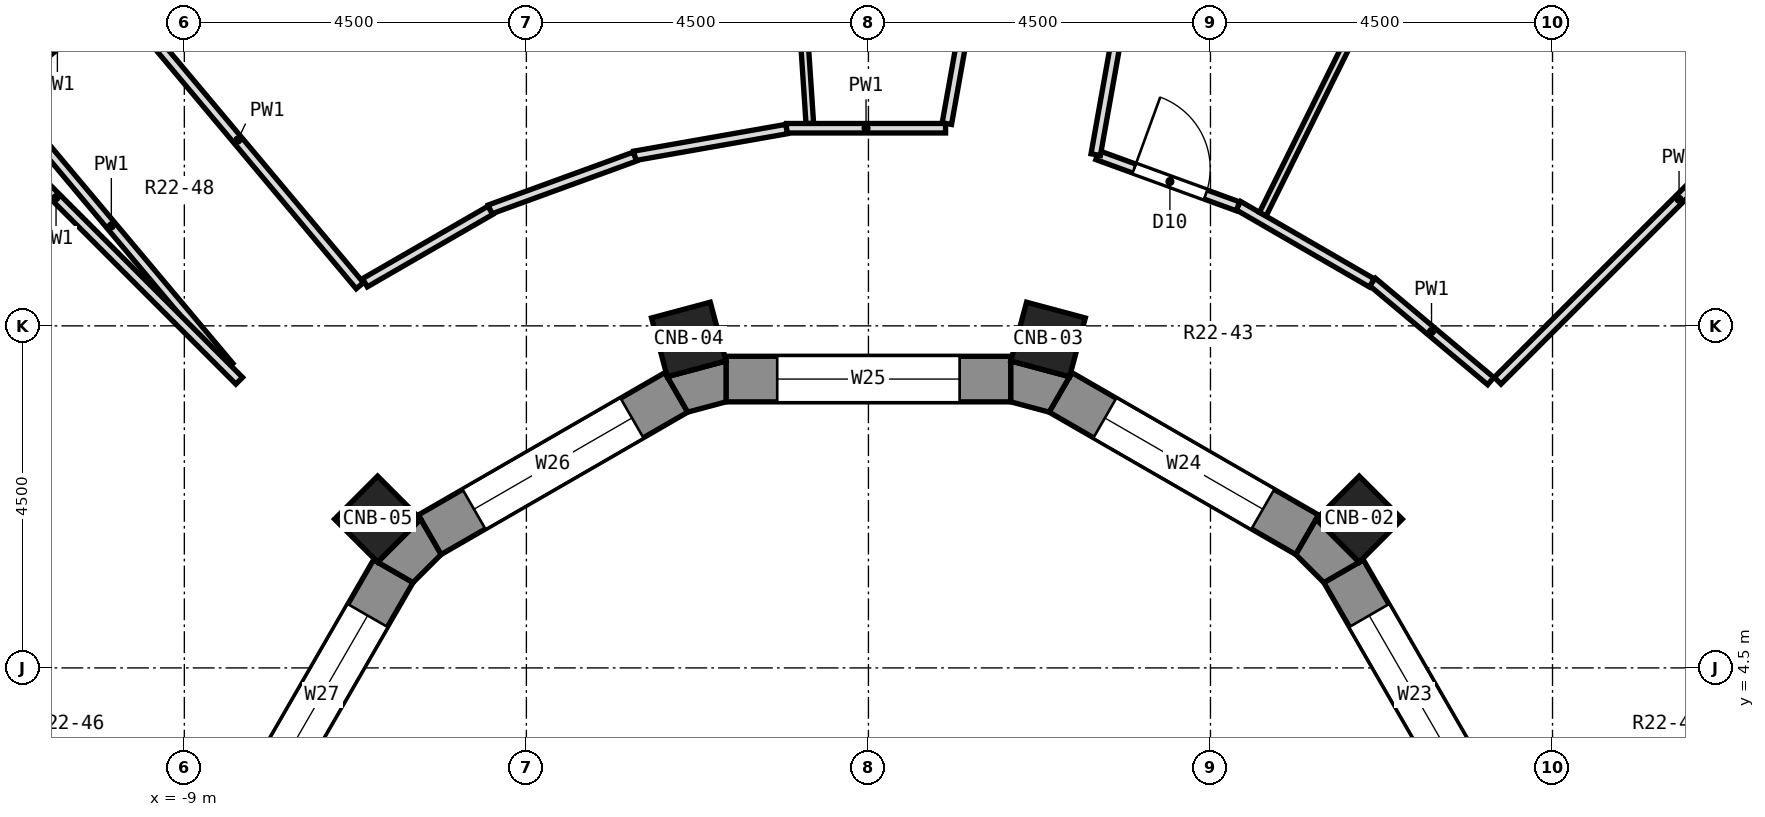
"""IFC4 building model, lengths in metres.
Left out: names, types, materials, properties, quantities, classifications, styles, units other than length and angle.
Written with IfcOpenShell. Run it as: python <this file> out.ifc"""

import sys

from ifc_helpers import new_model, si_unit, direction, frame, frame_2d, origin, origin_2d, place, context, subcontext, project, spatial, polyline, rectangle, outline, extrude, element, fill, save


model = new_model("IFC4")
c1 = context("Model", 3, precision=1e-05, world=origin(), true_north=direction((0.0, 1.0)))
c2 = subcontext(c1, "Body", "Model", "MODEL_VIEW")
j1 = project(units=[si_unit("LENGTHUNIT", "METRE"), si_unit("PLANEANGLEUNIT", "RADIAN")], contexts=[c1])
p1 = place(None, origin())
s1 = spatial("IfcSite", under=j1, at=p1, CompositionType="ELEMENT")
p2 = place(p1, origin())
s2 = spatial("IfcBuilding", under=s1, at=p2, CompositionType="ELEMENT")
p3 = place(p2, frame((0.0, 0.0, 141.4)))
s3 = spatial("IfcBuildingStorey", under=s2, at=p3, CompositionType="ELEMENT", Elevation=141.4)
for number, where, z_axis, x_axis in (
    (1, (6.458, 6.458, 0.0), (0.0, 0.0, 1.0), (0.707, 0.707, 0.0)),
    (2, (2.364, 8.821, 0.0), (0.0, 0.0, 1.0), (0.259, 0.966, 0.0)),
    (3, (-2.364, 8.821, 0.0), (0.0, 0.0, 1.0), (-0.259, 0.966, 0.0)),
    (4, (-6.458, 6.458, 0.0), (0.0, 0.0, 1.0), (-0.707, 0.707, 0.0)),
):
    element("IfcColumn", number, at=place(p3, frame(where, z_axis=z_axis, x_axis=x_axis)), inside=s3, PredefinedType="COLUMN", context=c2, shape_type="SweptSolid", body=[
        extrude(rectangle(XDim=0.8, YDim=0.8, at=origin_2d()), origin(), (0.0, 0.0, 1.0), 3.3),
    ])
p4 = place(p3, frame((8.125, 2.527, 0.0), z_axis=(0.0, 0.0, 1.0), x_axis=(-0.499964958637, 0.86604563398, 0.0)))
e5 = element("IfcWall", 5, at=p4, inside=s3, PredefinedType="SOLIDWALL", context=c2, shape_type="SweptSolid", body=[
    extrude(rectangle(XDim=3.747, YDim=0.6, at=frame_2d((1.874, 0.0))), origin(), (0.0, 0.0, 1.0), 2.8),
])
p5 = place(p4, frame((0.674, 0.0, 0.9)))
e6 = element("IfcOpeningElement", 6, at=p5, cuts=e5, PredefinedType="OPENING", context=c2, shape_type="SweptSolid", body=[
    extrude(rectangle(XDim=2.4, YDim=1.8, at=frame_2d((1.2, 0.9))), frame((0.0, 0.312, 0.0), z_axis=(0.0, -1.0, 0.0), x_axis=(1.0, 0.0, 0.0)), (0.0, 0.0, 1.0), 0.624),
])
p6 = place(p3, frame((5.773, 6.251, 0.0), z_axis=(0.0, 0.0, 1.0), x_axis=(-0.86604563398, 0.499964958637, 0.0)))
e7 = element("IfcWall", 7, at=p6, inside=s3, PredefinedType="SOLIDWALL", context=c2, shape_type="SweptSolid", body=[
    extrude(rectangle(XDim=3.747, YDim=0.6, at=frame_2d((1.874, 0.0))), origin(), (0.0, 0.0, 1.0), 2.8),
])
p7 = place(p6, frame((0.674, 0.0, 0.9)))
e8 = element("IfcOpeningElement", 8, at=p7, cuts=e7, PredefinedType="OPENING", context=c2, shape_type="SweptSolid", body=[
    extrude(rectangle(XDim=2.4, YDim=1.8, at=frame_2d((1.2, 0.9))), frame((0.0, 0.312, 0.0), z_axis=(0.0, -1.0, 0.0), x_axis=(1.0, 0.0, 0.0)), (0.0, 0.0, 1.0), 0.624),
])
p8 = place(p3, frame((1.874, 8.3, 0.0), z_axis=(0.0, 0.0, 1.0), x_axis=(-1.0, 0.0, 0.0)))
e9 = element("IfcWall", 9, at=p8, inside=s3, PredefinedType="SOLIDWALL", context=c2, shape_type="SweptSolid", body=[
    extrude(rectangle(XDim=3.748, YDim=0.6, at=frame_2d((1.874, 0.0))), origin(), (0.0, 0.0, 1.0), 2.8),
])
p9 = place(p8, frame((0.674, 0.0, 0.9)))
e10 = element("IfcOpeningElement", 10, at=p9, cuts=e9, PredefinedType="OPENING", context=c2, shape_type="SweptSolid", body=[
    extrude(rectangle(XDim=2.4, YDim=1.8, at=frame_2d((1.2, 0.9))), frame((0.0, 0.312, 0.0), z_axis=(0.0, -1.0, 0.0), x_axis=(1.0, 0.0, 0.0)), (0.0, 0.0, 1.0), 0.624),
])
p10 = place(p3, frame((-2.527, 8.125, 0.0), z_axis=(0.0, 0.0, 1.0), x_axis=(-0.86604563398, -0.499964958637, 0.0)))
e11 = element("IfcWall", 11, at=p10, inside=s3, PredefinedType="SOLIDWALL", context=c2, shape_type="SweptSolid", body=[
    extrude(rectangle(XDim=3.747, YDim=0.6, at=frame_2d((1.874, 0.0))), origin(), (0.0, 0.0, 1.0), 2.8),
])
p11 = place(p10, frame((0.674, 0.0, 0.9)))
e12 = element("IfcOpeningElement", 12, at=p11, cuts=e11, PredefinedType="OPENING", context=c2, shape_type="SweptSolid", body=[
    extrude(rectangle(XDim=2.4, YDim=1.8, at=frame_2d((1.2, 0.9))), frame((0.0, 0.312, 0.0), z_axis=(0.0, -1.0, 0.0), x_axis=(1.0, 0.0, 0.0)), (0.0, 0.0, 1.0), 0.624),
])
p12 = place(p3, frame((-6.251, 5.773, 0.0), z_axis=(0.0, 0.0, 1.0), x_axis=(-0.499964958637, -0.86604563398, 0.0)))
e13 = element("IfcWall", 13, at=p12, inside=s3, PredefinedType="SOLIDWALL", context=c2, shape_type="SweptSolid", body=[
    extrude(rectangle(XDim=3.747, YDim=0.6, at=frame_2d((1.874, 0.0))), origin(), (0.0, 0.0, 1.0), 2.8),
])
p13 = place(p12, frame((0.674, 0.0, 0.9)))
e14 = element("IfcOpeningElement", 14, at=p13, cuts=e13, PredefinedType="OPENING", context=c2, shape_type="SweptSolid", body=[
    extrude(rectangle(XDim=2.4, YDim=1.8, at=frame_2d((1.2, 0.9))), frame((0.0, 0.312, 0.0), z_axis=(0.0, -1.0, 0.0), x_axis=(1.0, 0.0, 0.0)), (0.0, 0.0, 1.0), 0.624),
])
p14 = place(p3, origin())
e15 = element("IfcWall", 15, at=p14, inside=s3, PredefinedType="SOLIDWALL", context=c2, shape_type="SweptSolid", body=[
    extrude(outline(polyline([(5.892, 6.458), (5.623, 5.991), (5.991, 5.623), (6.458, 5.892), (5.892, 6.458)])), origin(), (0.0, 0.0, 1.0), 2.8),
])
p15 = place(p3, origin())
e16 = element("IfcWall", 16, at=p15, inside=s3, PredefinedType="SOLIDWALL", context=c2, shape_type="SweptSolid", body=[
    extrude(outline(polyline([(1.874, 8.538), (1.874, 8.0), (2.377, 7.865), (2.646, 8.331), (1.874, 8.538)])), origin(), (0.0, 0.0, 1.0), 2.8),
])
p16 = place(p3, origin())
e17 = element("IfcWall", 17, at=p16, inside=s3, PredefinedType="SOLIDWALL", context=c2, shape_type="SweptSolid", body=[
    extrude(outline(polyline([(-2.646, 8.331), (-2.377, 7.865), (-1.874, 8.0), (-1.874, 8.538), (-2.646, 8.331)])), origin(), (0.0, 0.0, 1.0), 2.8),
])
p17 = place(p3, origin())
e18 = element("IfcWall", 18, at=p17, inside=s3, PredefinedType="SOLIDWALL", context=c2, shape_type="SweptSolid", body=[
    extrude(outline(polyline([(-6.458, 5.892), (-5.991, 5.623), (-5.623, 5.991), (-5.892, 6.458), (-6.458, 5.892)])), origin(), (0.0, 0.0, 1.0), 2.8),
])
p18 = place(p3, frame((-1.254, 18.949, 0.0), z_axis=(0.0, 0.0, 1.0), x_axis=(0.066059696755, -0.997815672589, 0.0)))
e19 = element("IfcWall", 19, at=p18, inside=s3, PredefinedType="PARTITIONING", context=c2, shape_type="SweptSolid", body=[
    extrude(rectangle(XDim=7.303, YDim=0.1, at=frame_2d((3.651, 0.0))), origin(), (0.0, 0.0, 1.0), 2.8),
])
p19 = place(p18, frame((3.208, 0.0, 0.0)))
e20 = element("IfcOpeningElement", 20, at=p19, cuts=e19, PredefinedType="OPENING", context=c2, shape_type="SweptSolid", body=[
    extrude(rectangle(XDim=0.9, YDim=2.1, at=frame_2d((0.45, 1.05))), frame((0.0, 0.062, 0.0), z_axis=(0.0, -1.0, 0.0), x_axis=(1.0, 0.0, 0.0)), (0.0, 0.0, 1.0), 0.124),
])
p20 = place(p3, frame((-11.511, 12.164, 0.0), z_axis=(0.0, 0.0, 1.0), x_axis=(0.64269368401, -0.766123246308, 0.0)))
e21 = element("IfcWall", 21, at=p20, inside=s3, PredefinedType="PARTITIONING", context=c2, shape_type="SweptSolid", body=[
    extrude(rectangle(XDim=4.826, YDim=0.125, at=frame_2d((2.413, 0.0))), origin(), (0.0, 0.0, 1.0), 2.8),
])
p21 = place(p3, frame((-9.904, 13.359, 0.0), z_axis=(0.0, 0.0, 1.0), x_axis=(0.64260671374, -0.766196196451, 0.0)))
e22 = element("IfcWall", 22, at=p21, inside=s3, PredefinedType="PARTITIONING", context=c2, shape_type="SweptSolid", body=[
    extrude(rectangle(XDim=5.0, YDim=0.125, at=frame_2d((2.5, 0.0))), origin(), (0.0, 0.0, 1.0), 2.8),
])
p22 = place(p3, frame((-13.097, 13.097, 0.0), z_axis=(0.0, 0.0, 1.0), x_axis=(0.707106781187, -0.707106781187, 0.0)))
e23 = element("IfcWall", 23, at=p22, inside=s3, PredefinedType="PARTITIONING", context=c2, shape_type="SweptSolid", body=[
    extrude(rectangle(XDim=6.815, YDim=0.125, at=frame_2d((3.407, 0.0))), origin(), (0.0, 0.0, 1.0), 2.8),
])
p23 = place(p3, frame((6.63, 9.579, 0.0), z_axis=(0.0, 0.0, 1.0), x_axis=(0.766246910896, -0.642546240781, 0.0)))
e24 = element("IfcWall", 24, at=p23, inside=s3, PredefinedType="PARTITIONING", context=c2, shape_type="SweptSolid", body=[
    extrude(rectangle(XDim=2.031, YDim=0.125, at=frame_2d((1.015, 0.0))), origin(), (0.0, 0.0, 1.0), 2.8),
])
p24 = place(p3, frame((4.865, 10.583, 0.0), z_axis=(0.0, 0.0, 1.0), x_axis=(0.865305530051, -0.50124479016, 0.0)))
e25 = element("IfcWall", 25, at=p24, inside=s3, PredefinedType="PARTITIONING", context=c2, shape_type="SweptSolid", body=[
    extrude(rectangle(XDim=2.031, YDim=0.125, at=frame_2d((1.015, 0.0))), origin(), (0.0, 0.0, 1.0), 2.8),
])
p25 = place(p3, frame((3.013, 11.246, 0.0), z_axis=(0.0, 0.0, 1.0), x_axis=(0.939532310436, -0.342460271633, 0.0)))
e26 = element("IfcWall", 26, at=p25, inside=s3, PredefinedType="PARTITIONING", context=c2, shape_type="SweptSolid", body=[
    extrude(rectangle(XDim=1.968, YDim=0.125, at=frame_2d((0.984, 0.0))), origin(), (0.0, 0.0, 1.0), 2.8),
])
p26 = place(p25, frame((0.515, 0.0, 0.0)))
e27 = element("IfcOpeningElement", 27, at=p26, cuts=e26, PredefinedType="OPENING", context=c2, shape_type="SweptSolid", body=[
    extrude(rectangle(XDim=1.0, YDim=2.1, at=frame_2d((0.5, 1.05))), frame((0.0, 0.074, 0.0), z_axis=(0.0, -1.0, 0.0), x_axis=(1.0, 0.0, 0.0)), (0.0, 0.0, 1.0), 0.149),
])
p27 = place(p3, frame((-1.078, 11.6, 0.0), z_axis=(0.0, 0.0, 1.0), x_axis=(1.0, 0.0, 0.0)))
e28 = element("IfcWall", 28, at=p27, inside=s3, PredefinedType="PARTITIONING", context=c2, shape_type="SweptSolid", body=[
    extrude(rectangle(XDim=2.093, YDim=0.125, at=frame_2d((1.047, 0.0))), origin(), (0.0, 0.0, 1.0), 2.8),
])
p28 = place(p3, frame((-3.076, 11.237, 0.0), z_axis=(0.0, 0.0, 1.0), x_axis=(0.984851276096, 0.173401164851, 0.0)))
e29 = element("IfcWall", 29, at=p28, inside=s3, PredefinedType="PARTITIONING", context=c2, shape_type="SweptSolid", body=[
    extrude(rectangle(XDim=2.03, YDim=0.125, at=frame_2d((1.015, 0.0))), origin(), (0.0, 0.0, 1.0), 2.8),
])
p29 = place(p3, frame((-4.981, 10.531, 0.0), z_axis=(0.0, 0.0, 1.0), x_axis=(0.939529919943, 0.342466829826, 0.0)))
e30 = element("IfcWall", 30, at=p29, inside=s3, PredefinedType="PARTITIONING", context=c2, shape_type="SweptSolid", body=[
    extrude(rectangle(XDim=2.031, YDim=0.125, at=frame_2d((1.016, 0.0))), origin(), (0.0, 0.0, 1.0), 2.8),
])
p30 = place(p3, frame((-6.624, 9.567, 0.0), z_axis=(0.0, 0.0, 1.0), x_axis=(0.865978549379, 0.500081145431, 0.0)))
e31 = element("IfcWall", 31, at=p30, inside=s3, PredefinedType="PARTITIONING", context=c2, shape_type="SweptSolid", body=[
    extrude(rectangle(XDim=1.905, YDim=0.125, at=frame_2d((0.953, 0.0))), origin(), (0.0, 0.0, 1.0), 2.8),
])
p31 = place(p3, frame((-11.388, 12.114, 0.0), z_axis=(0.0, 0.0, 1.0), x_axis=(0.766199817297, 0.642602396489, 0.0)))
e32 = element("IfcWall", 32, at=p31, inside=s3, PredefinedType="PARTITIONING", context=c2, shape_type="SweptSolid", body=[
    extrude(rectangle(XDim=1.875, YDim=0.125, at=frame_2d((0.937, 0.0))), origin(), (0.0, 0.0, 1.0), 2.8),
])
p32 = place(p3, frame((8.278, 8.278, 0.0), z_axis=(0.0, 0.0, 1.0), x_axis=(0.707106781187, 0.707106781187, 0.0)))
e33 = element("IfcWall", 33, at=p32, inside=s3, PredefinedType="PARTITIONING", context=c2, shape_type="SweptSolid", body=[
    extrude(rectangle(XDim=6.75, YDim=0.125, at=frame_2d((3.375, 0.0))), origin(), (0.0, 0.0, 1.0), 2.8),
])
p33 = place(p3, frame((5.189, 10.47, 0.0), z_axis=(0.0, 0.0, 1.0), x_axis=(0.444040739055, 0.896006597107, 0.0)))
e34 = element("IfcWall", 34, at=p33, inside=s3, PredefinedType="PARTITIONING", context=c2, shape_type="SweptSolid", body=[
    extrude(rectangle(XDim=7.301, YDim=0.1, at=frame_2d((3.65, 0.0))), origin(), (0.0, 0.0, 1.0), 2.8),
])
p34 = place(p33, frame((3.193, 0.0, 0.0)))
e35 = element("IfcOpeningElement", 35, at=p34, cuts=e34, PredefinedType="OPENING", context=c2, shape_type="SweptSolid", body=[
    extrude(rectangle(XDim=0.9, YDim=2.1, at=frame_2d((0.45, 1.05))), frame((0.0, 0.062, 0.0), z_axis=(0.0, -1.0, 0.0), x_axis=(1.0, 0.0, 0.0)), (0.0, 0.0, 1.0), 0.124),
])
p35 = place(p3, frame((2.99, 11.253, 0.0), z_axis=(0.0, 0.0, 1.0), x_axis=(0.175376377953, 0.984501460667, 0.0)))
e36 = element("IfcWall", 36, at=p35, inside=s3, PredefinedType="PARTITIONING", context=c2, shape_type="SweptSolid", body=[
    extrude(rectangle(XDim=4.936, YDim=0.125, at=frame_2d((2.468, 0.0))), origin(), (0.0, 0.0, 1.0), 2.8),
])
p36 = place(p3, frame((1.032, 11.661, 0.0), z_axis=(0.0, 0.0, 1.0), x_axis=(0.175547946832, 0.984470882435, 0.0)))
e37 = element("IfcWall", 37, at=p36, inside=s3, PredefinedType="PARTITIONING", context=c2, shape_type="SweptSolid", body=[
    extrude(rectangle(XDim=4.875, YDim=0.125, at=frame_2d((2.437, 0.0))), origin(), (0.0, 0.0, 1.0), 2.8),
])
p37 = place(p5, origin())
e38 = element("IfcWindow", 38, at=p37, inside=s3, PartitioningType="SINGLE_PANEL", PredefinedType="WINDOW", context=c2, shape_type="SweptSolid", body=[
    extrude(rectangle(XDim=2.4, YDim=1.8, at=frame_2d((1.2, 0.9))), frame((0.0, -0.12, 0.0), z_axis=(0.0, -1.0, 0.0), x_axis=(1.0, 0.0, 0.0)), (0.0, 0.0, 1.0), 0.06),
])
fill(e6, e38)
p38 = place(p7, origin())
e39 = element("IfcWindow", 39, at=p38, inside=s3, PartitioningType="SINGLE_PANEL", PredefinedType="WINDOW", context=c2, shape_type="SweptSolid", body=[
    extrude(rectangle(XDim=2.4, YDim=1.8, at=frame_2d((1.2, 0.9))), frame((0.0, -0.12, 0.0), z_axis=(0.0, -1.0, 0.0), x_axis=(1.0, 0.0, 0.0)), (0.0, 0.0, 1.0), 0.06),
])
fill(e8, e39)
p39 = place(p9, origin())
e40 = element("IfcWindow", 40, at=p39, inside=s3, PartitioningType="SINGLE_PANEL", PredefinedType="WINDOW", context=c2, shape_type="SweptSolid", body=[
    extrude(rectangle(XDim=2.4, YDim=1.8, at=frame_2d((1.2, 0.9))), frame((0.0, -0.12, 0.0), z_axis=(0.0, -1.0, 0.0), x_axis=(1.0, 0.0, 0.0)), (0.0, 0.0, 1.0), 0.06),
])
fill(e10, e40)
p40 = place(p11, origin())
e41 = element("IfcWindow", 41, at=p40, inside=s3, PartitioningType="SINGLE_PANEL", PredefinedType="WINDOW", context=c2, shape_type="SweptSolid", body=[
    extrude(rectangle(XDim=2.4, YDim=1.8, at=frame_2d((1.2, 0.9))), frame((0.0, -0.12, 0.0), z_axis=(0.0, -1.0, 0.0), x_axis=(1.0, 0.0, 0.0)), (0.0, 0.0, 1.0), 0.06),
])
fill(e12, e41)
p41 = place(p13, origin())
e42 = element("IfcWindow", 42, at=p41, inside=s3, PartitioningType="SINGLE_PANEL", PredefinedType="WINDOW", context=c2, shape_type="SweptSolid", body=[
    extrude(rectangle(XDim=2.4, YDim=1.8, at=frame_2d((1.2, 0.9))), frame((0.0, -0.12, 0.0), z_axis=(0.0, -1.0, 0.0), x_axis=(1.0, 0.0, 0.0)), (0.0, 0.0, 1.0), 0.06),
])
fill(e14, e42)
p42 = place(p26, origin())
e43 = element("IfcDoor", 43, at=p42, inside=s3, OperationType="SINGLE_SWING_LEFT", PredefinedType="DOOR", context=c2, shape_type="SweptSolid", body=[
    extrude(rectangle(XDim=1.0, YDim=2.1, at=frame_2d((0.5, 1.05))), frame((0.0, 0.025, 0.0), z_axis=(0.0, -1.0, 0.0), x_axis=(1.0, 0.0, 0.0)), (0.0, 0.0, 1.0), 0.05),
])
fill(e27, e43)
save(model, sys.argv[1])
